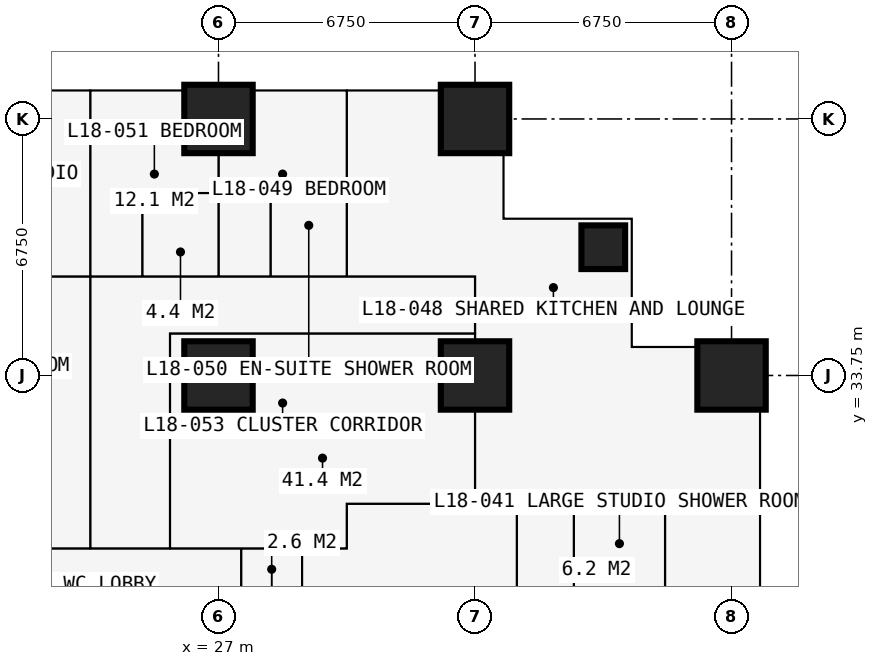
"""IFC4 building model, lengths in metres.
Left out: names, types, materials, properties, quantities, classifications, styles, units other than length and angle.
Written with IfcOpenShell. Run it as: python <this file> out.ifc"""

import sys

from ifc_helpers import new_model, si_unit, direction, frame, frame_2d, origin, origin_2d, place, context, subcontext, project, spatial, rectangle, extrude, element, fill, save


model = new_model("IFC4")
c1 = context("Model", 3, precision=1e-05, world=origin(), true_north=direction((0.0, 1.0)))
c2 = subcontext(c1, "Body", "Model", "MODEL_VIEW")
j1 = project(units=[si_unit("LENGTHUNIT", "METRE"), si_unit("PLANEANGLEUNIT", "RADIAN")], contexts=[c1])
p1 = place(None, origin())
s1 = spatial("IfcSite", under=j1, at=p1, CompositionType="ELEMENT")
p2 = place(p1, origin())
s2 = spatial("IfcBuilding", under=s1, at=p2, CompositionType="ELEMENT")
p3 = place(p2, frame((0.0, 0.0, 68.4)))
s3 = spatial("IfcBuildingStorey", under=s2, at=p3, CompositionType="ELEMENT", Elevation=68.4)
for number, where, z_axis, x_axis in (
    (1, (27.0, 33.75, 0.0), (0.0, 0.0, 1.0), (1.0, 0.0, 0.0)),
    (2, (27.0, 40.5, 0.0), (0.0, 0.0, 1.0), (1.0, 0.0, 0.0)),
    (3, (33.75, 33.75, 0.0), (0.0, 0.0, 1.0), (1.0, 0.0, 0.0)),
    (4, (33.75, 40.5, 0.0), (0.0, 0.0, 1.0), (1.0, 0.0, 0.0)),
):
    element("IfcColumn", number, at=place(p3, frame(where, z_axis=z_axis, x_axis=x_axis)), inside=s3, PredefinedType="COLUMN", context=c2, shape_type="SweptSolid", body=[
        extrude(rectangle(XDim=1.8, YDim=1.8, at=origin_2d()), origin(), (0.0, 0.0, 1.0), 3.6),
    ])
p4 = place(p3, frame((37.125, 37.125, 0.0), z_axis=(0.0, 0.0, 1.0), x_axis=(1.0, 0.0, 0.0)))
e5 = element("IfcColumn", 5, at=p4, inside=s3, PredefinedType="COLUMN", context=c2, shape_type="SweptSolid", body=[
    extrude(rectangle(XDim=1.15, YDim=1.15, at=origin_2d()), origin(), (0.0, 0.0, 1.0), 3.6),
])
p5 = place(p3, frame((40.5, 33.75, 0.0), z_axis=(0.0, 0.0, 1.0), x_axis=(1.0, 0.0, 0.0)))
e6 = element("IfcColumn", 6, at=p5, inside=s3, PredefinedType="COLUMN", context=c2, shape_type="SweptSolid", body=[
    extrude(rectangle(XDim=1.8, YDim=1.8, at=origin_2d()), origin(), (0.0, 0.0, 1.0), 3.6),
])
p6 = place(p3, frame((41.25, 34.5, 0.0), z_axis=(0.0, 0.0, 1.0), x_axis=(-1.0, 0.0, 0.0)))
e7 = element("IfcWall", 7, at=p6, inside=s3, PredefinedType="SOLIDWALL", context=c2, shape_type="SweptSolid", body=[
    extrude(rectangle(XDim=3.375, YDim=0.3, at=frame_2d((1.688, 0.0))), origin(), (0.0, 0.0, 1.0), 3.375),
])
p7 = place(p6, frame((1.833, 0.0, 0.9)))
e8 = element("IfcOpeningElement", 8, at=p7, cuts=e7, PredefinedType="OPENING", context=c2, shape_type="SweptSolid", body=[
    extrude(rectangle(XDim=1.2, YDim=1.8, at=frame_2d((0.6, 0.9))), frame((0.0, 0.16, 0.0), z_axis=(0.0, -1.0, 0.0), x_axis=(1.0, 0.0, 0.0)), (0.0, 0.0, 1.0), 0.32),
])
p8 = place(p3, frame((37.875, 34.5, 0.0), z_axis=(0.0, 0.0, 1.0), x_axis=(0.0, 1.0, 0.0)))
e9 = element("IfcWall", 9, at=p8, inside=s3, PredefinedType="SOLIDWALL", context=c2, shape_type="SweptSolid", body=[
    extrude(rectangle(XDim=3.375, YDim=0.3, at=frame_2d((1.688, 0.0))), origin(), (0.0, 0.0, 1.0), 3.375),
])
p9 = place(p8, frame((0.788, 0.0, 0.6)))
e10 = element("IfcOpeningElement", 10, at=p9, cuts=e9, PredefinedType="OPENING", context=c2, shape_type="SweptSolid", body=[
    extrude(rectangle(XDim=1.8, YDim=2.1, at=frame_2d((0.9, 1.05))), frame((0.0, 0.16, 0.0), z_axis=(0.0, -1.0, 0.0), x_axis=(1.0, 0.0, 0.0)), (0.0, 0.0, 1.0), 0.32),
])
p10 = place(p3, frame((37.875, 37.875, 0.0), z_axis=(0.0, 0.0, 1.0), x_axis=(-1.0, 0.0, 0.0)))
e11 = element("IfcWall", 11, at=p10, inside=s3, PredefinedType="SOLIDWALL", context=c2, shape_type="SweptSolid", body=[
    extrude(rectangle(XDim=3.375, YDim=0.3, at=frame_2d((1.688, 0.0))), origin(), (0.0, 0.0, 1.0), 3.375),
])
p11 = place(p10, frame((0.788, 0.0, 0.6)))
e12 = element("IfcOpeningElement", 12, at=p11, cuts=e11, PredefinedType="OPENING", context=c2, shape_type="SweptSolid", body=[
    extrude(rectangle(XDim=1.8, YDim=2.1, at=frame_2d((0.9, 1.05))), frame((0.0, 0.16, 0.0), z_axis=(0.0, -1.0, 0.0), x_axis=(1.0, 0.0, 0.0)), (0.0, 0.0, 1.0), 0.32),
])
p12 = place(p3, frame((34.5, 37.875, 0.0), z_axis=(0.0, 0.0, 1.0), x_axis=(0.0, 1.0, 0.0)))
e13 = element("IfcWall", 13, at=p12, inside=s3, PredefinedType="SOLIDWALL", context=c2, shape_type="SweptSolid", body=[
    extrude(rectangle(XDim=3.375, YDim=0.3, at=frame_2d((1.688, 0.0))), origin(), (0.0, 0.0, 1.0), 3.375),
])
p13 = place(p12, frame((0.343, 0.0, 0.9)))
e14 = element("IfcOpeningElement", 14, at=p13, cuts=e13, PredefinedType="OPENING", context=c2, shape_type="SweptSolid", body=[
    extrude(rectangle(XDim=1.2, YDim=1.8, at=frame_2d((0.6, 0.9))), frame((0.0, 0.16, 0.0), z_axis=(0.0, -1.0, 0.0), x_axis=(1.0, 0.0, 0.0)), (0.0, 0.0, 1.0), 0.32),
])
p14 = place(p3, frame((10.125, 36.35, 0.0), z_axis=(0.0, 0.0, 1.0), x_axis=(1.0, 0.0, 0.0)))
e15 = element("IfcWall", 15, at=p14, inside=s3, PredefinedType="PARTITIONING", context=c2, shape_type="SweptSolid", body=[
    extrude(rectangle(XDim=23.625, YDim=0.15, at=frame_2d((11.812, 0.0))), origin(), (0.0, 0.0, 1.0), 3.375),
])
p15 = place(p14, frame((21.45, 0.0, 0.0)))
e16 = element("IfcOpeningElement", 16, at=p15, cuts=e15, PredefinedType="OPENING", context=c2, shape_type="SweptSolid", body=[
    extrude(rectangle(XDim=1.0, YDim=2.2, at=frame_2d((0.5, 1.1))), frame((0.0, 0.085, 0.0), z_axis=(0.0, -1.0, 0.0), x_axis=(1.0, 0.0, 0.0)), (0.0, 0.0, 1.0), 0.17),
])
p16 = place(p14, frame((17.125, 0.0, 0.0)))
e17 = element("IfcOpeningElement", 17, at=p16, cuts=e15, PredefinedType="OPENING", context=c2, shape_type="SweptSolid", body=[
    extrude(rectangle(XDim=0.95, YDim=2.2, at=frame_2d((0.475, 1.1))), frame((0.0, 0.085, 0.0), z_axis=(0.0, -1.0, 0.0), x_axis=(1.0, 0.0, 0.0)), (0.0, 0.0, 1.0), 0.17),
])
p17 = place(p14, frame((13.7, 0.0, 0.0)))
e18 = element("IfcOpeningElement", 18, at=p17, cuts=e15, PredefinedType="OPENING", context=c2, shape_type="SweptSolid", body=[
    extrude(rectangle(XDim=0.95, YDim=2.2, at=frame_2d((0.475, 1.1))), frame((0.0, 0.085, 0.0), z_axis=(0.0, -1.0, 0.0), x_axis=(1.0, 0.0, 0.0)), (0.0, 0.0, 1.0), 0.17),
])
p18 = place(p14, frame((4.2, 0.0, 0.0)))
e19 = element("IfcOpeningElement", 19, at=p18, cuts=e15, PredefinedType="OPENING", context=c2, shape_type="SweptSolid", body=[
    extrude(rectangle(XDim=0.95, YDim=2.2, at=frame_2d((0.475, 1.1))), frame((0.0, 0.085, 0.0), z_axis=(0.0, -1.0, 0.0), x_axis=(1.0, 0.0, 0.0)), (0.0, 0.0, 1.0), 0.17),
])
p19 = place(p14, frame((10.95, 0.0, 0.0)))
e20 = element("IfcOpeningElement", 20, at=p19, cuts=e15, PredefinedType="OPENING", context=c2, shape_type="SweptSolid", body=[
    extrude(rectangle(XDim=0.95, YDim=2.2, at=frame_2d((0.475, 1.1))), frame((0.0, 0.085, 0.0), z_axis=(0.0, -1.0, 0.0), x_axis=(1.0, 0.0, 0.0)), (0.0, 0.0, 1.0), 0.17),
])
p20 = place(p3, frame((11.3, 29.2, 0.0), z_axis=(0.0, 0.0, 1.0), x_axis=(1.0, 0.0, 0.0)))
e21 = element("IfcWall", 21, at=p20, inside=s3, PredefinedType="PARTITIONING", context=c2, shape_type="SweptSolid", body=[
    extrude(rectangle(XDim=19.075, YDim=0.15, at=frame_2d((9.538, 0.0))), origin(), (0.0, 0.0, 1.0), 3.375),
])
p21 = place(p20, frame((12.875, 0.0, 0.0)))
e22 = element("IfcOpeningElement", 22, at=p21, cuts=e21, PredefinedType="OPENING", context=c2, shape_type="SweptSolid", body=[
    extrude(rectangle(XDim=1.0, YDim=2.2, at=frame_2d((0.5, 1.1))), frame((0.0, 0.085, 0.0), z_axis=(0.0, -1.0, 0.0), x_axis=(1.0, 0.0, 0.0)), (0.0, 0.0, 1.0), 0.17),
])
p22 = place(p20, frame((10.438, 0.0, 0.0)))
e23 = element("IfcOpeningElement", 23, at=p22, cuts=e21, PredefinedType="OPENING", context=c2, shape_type="SweptSolid", body=[
    extrude(rectangle(XDim=1.0, YDim=2.2, at=frame_2d((0.5, 1.1))), frame((0.0, 0.085, 0.0), z_axis=(0.0, -1.0, 0.0), x_axis=(1.0, 0.0, 0.0)), (0.0, 0.0, 1.0), 0.17),
])
p23 = place(p20, frame((14.875, 0.0, 0.0)))
e24 = element("IfcOpeningElement", 24, at=p23, cuts=e21, PredefinedType="OPENING", context=c2, shape_type="SweptSolid", body=[
    extrude(rectangle(XDim=0.95, YDim=2.2, at=frame_2d((0.475, 1.1))), frame((0.0, 0.085, 0.0), z_axis=(0.0, -1.0, 0.0), x_axis=(1.0, 0.0, 0.0)), (0.0, 0.0, 1.0), 0.17),
])
p24 = place(p3, frame((23.625, 29.2, 0.0), z_axis=(0.0, 0.0, 1.0), x_axis=(0.0, 1.0, 0.0)))
e25 = element("IfcWall", 25, at=p24, inside=s3, PredefinedType="PARTITIONING", context=c2, shape_type="SweptSolid", body=[
    extrude(rectangle(XDim=12.034, YDim=0.15, at=frame_2d((6.017, 0.0))), origin(), (0.0, 0.0, 1.0), 3.375),
])
p25 = place(p3, frame((25.0, 36.35, 0.0), z_axis=(0.0, 0.0, 1.0), x_axis=(0.0, 1.0, 0.0)))
e26 = element("IfcWall", 26, at=p25, inside=s3, PredefinedType="PARTITIONING", context=c2, shape_type="SweptSolid", body=[
    extrude(rectangle(XDim=2.2, YDim=0.1, at=frame_2d((1.1, 0.0))), origin(), (0.0, 0.0, 1.0), 3.375),
])
p26 = place(p3, frame((25.0, 38.55, 0.0), z_axis=(0.0, 0.0, 1.0), x_axis=(1.0, 0.0, 0.0)))
e27 = element("IfcWall", 27, at=p26, inside=s3, PredefinedType="PARTITIONING", context=c2, shape_type="SweptSolid", body=[
    extrude(rectangle(XDim=2.0, YDim=0.1, at=frame_2d((1.0, 0.0))), origin(), (0.0, 0.0, 1.0), 3.375),
])
p27 = place(p3, frame((25.725, 29.2, 0.0), z_axis=(0.0, 0.0, 1.0), x_axis=(0.0, 1.0, 0.0)))
e28 = element("IfcWall", 28, at=p27, inside=s3, PredefinedType="PARTITIONING", context=c2, shape_type="SweptSolid", body=[
    extrude(rectangle(XDim=5.65, YDim=0.15, at=frame_2d((2.825, 0.0))), origin(), (0.0, 0.0, 1.0), 3.375),
])
p28 = place(p3, frame((25.725, 34.85, 0.0), z_axis=(0.0, 0.0, 1.0), x_axis=(1.0, 0.0, 0.0)))
e29 = element("IfcWall", 29, at=p28, inside=s3, PredefinedType="PARTITIONING", context=c2, shape_type="SweptSolid", body=[
    extrude(rectangle(XDim=8.025, YDim=0.15, at=frame_2d((4.012, 0.0))), origin(), (0.0, 0.0, 1.0), 3.375),
])
p29 = place(p3, frame((27.0, 36.35, 0.0), z_axis=(0.0, 0.0, 1.0), x_axis=(0.0, 1.0, 0.0)))
e30 = element("IfcWall", 30, at=p29, inside=s3, PredefinedType="PARTITIONING", context=c2, shape_type="SweptSolid", body=[
    extrude(rectangle(XDim=4.884, YDim=0.175, at=frame_2d((2.442, 0.0))), origin(), (0.0, 0.0, 1.0), 2.61),
])
p30 = place(p29, frame((0.65, 0.0, 0.0)))
e31 = element("IfcOpeningElement", 31, at=p30, cuts=e30, PredefinedType="OPENING", context=c2, shape_type="SweptSolid", body=[
    extrude(rectangle(XDim=0.9, YDim=2.2, at=frame_2d((0.45, 1.1))), frame((0.0, 0.097, 0.0), z_axis=(0.0, -1.0, 0.0), x_axis=(1.0, 0.0, 0.0)), (0.0, 0.0, 1.0), 0.195),
])
p31 = place(p3, frame((27.6, 27.6, 0.0), z_axis=(0.0, 0.0, 1.0), x_axis=(0.0, 1.0, 0.0)))
e32 = element("IfcWall", 32, at=p31, inside=s3, PredefinedType="PARTITIONING", context=c2, shape_type="SweptSolid", body=[
    extrude(rectangle(XDim=1.6, YDim=0.15, at=frame_2d((0.8, 0.0))), origin(), (0.0, 0.0, 1.0), 3.375),
])
p32 = place(p31, frame((0.3, 0.0, 0.0)))
e33 = element("IfcOpeningElement", 33, at=p32, cuts=e32, PredefinedType="OPENING", context=c2, shape_type="SweptSolid", body=[
    extrude(rectangle(XDim=0.95, YDim=2.2, at=frame_2d((0.475, 1.1))), frame((0.0, 0.085, 0.0), z_axis=(0.0, -1.0, 0.0), x_axis=(1.0, 0.0, 0.0)), (0.0, 0.0, 1.0), 0.17),
])
p33 = place(p3, frame((28.375, 36.35, 0.0), z_axis=(0.0, 0.0, 1.0), x_axis=(0.0, 1.0, 0.0)))
e34 = element("IfcWall", 34, at=p33, inside=s3, PredefinedType="PARTITIONING", context=c2, shape_type="SweptSolid", body=[
    extrude(rectangle(XDim=2.2, YDim=0.1, at=frame_2d((1.1, 0.0))), origin(), (0.0, 0.0, 1.0), 3.375),
])
p34 = place(p33, frame((0.65, 0.0, 0.0)))
e35 = element("IfcOpeningElement", 35, at=p34, cuts=e34, PredefinedType="OPENING", context=c2, shape_type="SweptSolid", body=[
    extrude(rectangle(XDim=0.9, YDim=2.2, at=frame_2d((0.45, 1.1))), frame((0.0, 0.06, 0.0), z_axis=(0.0, -1.0, 0.0), x_axis=(1.0, 0.0, 0.0)), (0.0, 0.0, 1.0), 0.12),
])
p35 = place(p3, frame((28.375, 38.55, 0.0), z_axis=(0.0, 0.0, 1.0), x_axis=(1.0, 0.0, 0.0)))
e36 = element("IfcWall", 36, at=p35, inside=s3, PredefinedType="PARTITIONING", context=c2, shape_type="SweptSolid", body=[
    extrude(rectangle(XDim=2.0, YDim=0.1, at=frame_2d((1.0, 0.0))), origin(), (0.0, 0.0, 1.0), 3.375),
])
p36 = place(p3, frame((29.2, 11.3, 0.0), z_axis=(0.0, 0.0, 1.0), x_axis=(0.0, 1.0, 0.0)))
e37 = element("IfcWall", 37, at=p36, inside=s3, PredefinedType="PARTITIONING", context=c2, shape_type="SweptSolid", body=[
    extrude(rectangle(XDim=17.9, YDim=0.2, at=frame_2d((8.95, 0.0))), origin(), (0.0, 0.0, 1.0), 3.375),
])
p37 = place(p36, frame((8.35, 0.0, 0.0)))
e38 = element("IfcOpeningElement", 38, at=p37, cuts=e37, PredefinedType="OPENING", context=c2, shape_type="SweptSolid", body=[
    extrude(rectangle(XDim=1.2, YDim=2.2, at=frame_2d((0.6, 1.1))), frame((0.0, 0.11, 0.0), z_axis=(0.0, -1.0, 0.0), x_axis=(1.0, 0.0, 0.0)), (0.0, 0.0, 1.0), 0.22),
])
p38 = place(p3, frame((30.375, 29.2, 0.0), z_axis=(0.0, 0.0, 1.0), x_axis=(0.0, 1.0, 0.0)))
e39 = element("IfcWall", 39, at=p38, inside=s3, PredefinedType="PARTITIONING", context=c2, shape_type="SweptSolid", body=[
    extrude(rectangle(XDim=1.175, YDim=0.15, at=frame_2d((0.587, 0.0))), origin(), (0.0, 0.0, 1.0), 3.375),
])
p39 = place(p3, frame((30.375, 30.375, 0.0), z_axis=(0.0, 0.0, 1.0), x_axis=(1.0, 0.0, 0.0)))
e40 = element("IfcWall", 40, at=p39, inside=s3, PredefinedType="PARTITIONING", context=c2, shape_type="SweptSolid", body=[
    extrude(rectangle(XDim=10.859, YDim=0.15, at=frame_2d((5.429, 0.0))), origin(), (0.0, 0.0, 1.0), 3.375),
])
p40 = place(p3, frame((30.375, 36.35, 0.0), z_axis=(0.0, 0.0, 1.0), x_axis=(0.0, 1.0, 0.0)))
e41 = element("IfcWall", 41, at=p40, inside=s3, PredefinedType="PARTITIONING", context=c2, shape_type="SweptSolid", body=[
    extrude(rectangle(XDim=4.884, YDim=0.15, at=frame_2d((2.442, 0.0))), origin(), (0.0, 0.0, 1.0), 3.375),
])
p41 = place(p3, frame((33.75, 30.375, 0.0), z_axis=(0.0, 0.0, 1.0), x_axis=(0.0, 1.0, 0.0)))
e42 = element("IfcWall", 42, at=p41, inside=s3, PredefinedType="PARTITIONING", context=c2, shape_type="SweptSolid", body=[
    extrude(rectangle(XDim=5.975, YDim=0.15, at=frame_2d((2.988, 0.0))), origin(), (0.0, 0.0, 1.0), 2.877),
])
p42 = place(p3, frame((34.85, 12.55, 0.0), z_axis=(0.0, 0.0, 1.0), x_axis=(0.0, 1.0, 0.0)))
e43 = element("IfcWall", 43, at=p42, inside=s3, PredefinedType="PARTITIONING", context=c2, shape_type="SweptSolid", body=[
    extrude(rectangle(XDim=17.825, YDim=0.15, at=frame_2d((8.913, 0.0))), origin(), (0.0, 0.0, 1.0), 3.375),
])
p43 = place(p42, frame((8.6, 0.0, 0.0)))
e44 = element("IfcOpeningElement", 44, at=p43, cuts=e43, PredefinedType="OPENING", context=c2, shape_type="SweptSolid", body=[
    extrude(rectangle(XDim=0.95, YDim=2.2, at=frame_2d((0.475, 1.1))), frame((0.0, 0.085, 0.0), z_axis=(0.0, -1.0, 0.0), x_axis=(1.0, 0.0, 0.0)), (0.0, 0.0, 1.0), 0.17),
])
p44 = place(p3, frame((36.35, 6.75, 0.0), z_axis=(0.0, 0.0, 1.0), x_axis=(0.0, 1.0, 0.0)))
e45 = element("IfcWall", 45, at=p44, inside=s3, PredefinedType="PARTITIONING", context=c2, shape_type="SweptSolid", body=[
    extrude(rectangle(XDim=23.625, YDim=0.15, at=frame_2d((11.812, 0.0))), origin(), (0.0, 0.0, 1.0), 3.375),
])
p45 = place(p44, frame((0.2, 0.0, 0.0)))
e46 = element("IfcOpeningElement", 46, at=p45, cuts=e45, PredefinedType="OPENING", context=c2, shape_type="SweptSolid", body=[
    extrude(rectangle(XDim=0.95, YDim=2.2, at=frame_2d((0.475, 1.1))), frame((0.0, 0.085, 0.0), z_axis=(0.0, -1.0, 0.0), x_axis=(1.0, 0.0, 0.0)), (0.0, 0.0, 1.0), 0.17),
])
p46 = place(p44, frame((18.475, 0.0, 0.0)))
e47 = element("IfcOpeningElement", 47, at=p46, cuts=e45, PredefinedType="OPENING", context=c2, shape_type="SweptSolid", body=[
    extrude(rectangle(XDim=0.95, YDim=2.2, at=frame_2d((0.475, 1.1))), frame((0.0, 0.085, 0.0), z_axis=(0.0, -1.0, 0.0), x_axis=(1.0, 0.0, 0.0)), (0.0, 0.0, 1.0), 0.17),
])
p47 = place(p44, frame((11.725, 0.0, 0.0)))
e48 = element("IfcOpeningElement", 48, at=p47, cuts=e45, PredefinedType="OPENING", context=c2, shape_type="SweptSolid", body=[
    extrude(rectangle(XDim=0.95, YDim=2.2, at=frame_2d((0.475, 1.1))), frame((0.0, 0.085, 0.0), z_axis=(0.0, -1.0, 0.0), x_axis=(1.0, 0.0, 0.0)), (0.0, 0.0, 1.0), 0.17),
])
p48 = place(p44, frame((4.975, 0.0, 0.0)))
e49 = element("IfcOpeningElement", 49, at=p48, cuts=e45, PredefinedType="OPENING", context=c2, shape_type="SweptSolid", body=[
    extrude(rectangle(XDim=0.95, YDim=2.2, at=frame_2d((0.475, 1.1))), frame((0.0, 0.085, 0.0), z_axis=(0.0, -1.0, 0.0), x_axis=(1.0, 0.0, 0.0)), (0.0, 0.0, 1.0), 0.17),
])
p49 = place(p3, frame((38.75, 27.775, 0.0), z_axis=(0.0, 0.0, 1.0), x_axis=(0.0, 1.0, 0.0)))
e50 = element("IfcWall", 50, at=p49, inside=s3, PredefinedType="PARTITIONING", context=c2, shape_type="SweptSolid", body=[
    extrude(rectangle(XDim=2.6, YDim=0.1, at=frame_2d((1.3, 0.0))), origin(), (0.0, 0.0, 1.0), 3.375),
])
p50 = place(p49, frame((0.85, 0.0, 0.0)))
e51 = element("IfcOpeningElement", 51, at=p50, cuts=e50, PredefinedType="OPENING", context=c2, shape_type="SweptSolid", body=[
    extrude(rectangle(XDim=0.9, YDim=2.2, at=frame_2d((0.45, 1.1))), frame((0.0, 0.06, 0.0), z_axis=(0.0, -1.0, 0.0), x_axis=(1.0, 0.0, 0.0)), (0.0, 0.0, 1.0), 0.12),
])
p51 = place(p7, origin())
e52 = element("IfcWindow", 52, at=p51, inside=s3, PartitioningType="SINGLE_PANEL", PredefinedType="WINDOW", context=c2, shape_type="SweptSolid", body=[
    extrude(rectangle(XDim=1.2, YDim=1.8, at=frame_2d((0.6, 0.9))), frame((0.0, 0.03, 0.0), z_axis=(0.0, -1.0, 0.0), x_axis=(1.0, 0.0, 0.0)), (0.0, 0.0, 1.0), 0.06),
])
fill(e8, e52)
p52 = place(p9, origin())
e53 = element("IfcWindow", 53, at=p52, inside=s3, PartitioningType="SINGLE_PANEL", PredefinedType="WINDOW", context=c2, shape_type="SweptSolid", body=[
    extrude(rectangle(XDim=1.8, YDim=2.1, at=frame_2d((0.9, 1.05))), frame((0.0, 0.03, 0.0), z_axis=(0.0, -1.0, 0.0), x_axis=(1.0, 0.0, 0.0)), (0.0, 0.0, 1.0), 0.06),
])
fill(e10, e53)
p53 = place(p11, origin())
e54 = element("IfcWindow", 54, at=p53, inside=s3, PartitioningType="SINGLE_PANEL", PredefinedType="WINDOW", context=c2, shape_type="SweptSolid", body=[
    extrude(rectangle(XDim=1.8, YDim=2.1, at=frame_2d((0.9, 1.05))), frame((0.0, 0.03, 0.0), z_axis=(0.0, -1.0, 0.0), x_axis=(1.0, 0.0, 0.0)), (0.0, 0.0, 1.0), 0.06),
])
fill(e12, e54)
p54 = place(p13, origin())
e55 = element("IfcWindow", 55, at=p54, inside=s3, PartitioningType="SINGLE_PANEL", PredefinedType="WINDOW", context=c2, shape_type="SweptSolid", body=[
    extrude(rectangle(XDim=1.2, YDim=1.8, at=frame_2d((0.6, 0.9))), frame((0.0, 0.03, 0.0), z_axis=(0.0, -1.0, 0.0), x_axis=(1.0, 0.0, 0.0)), (0.0, 0.0, 1.0), 0.06),
])
fill(e14, e55)
p55 = place(p32, origin())
e56 = element("IfcDoor", 56, at=p55, inside=s3, OperationType="SINGLE_SWING_LEFT", PredefinedType="DOOR", context=c2, shape_type="SweptSolid", body=[
    extrude(rectangle(XDim=0.95, YDim=2.2, at=frame_2d((0.475, 1.1))), frame((0.0, 0.025, 0.0), z_axis=(0.0, -1.0, 0.0), x_axis=(1.0, 0.0, 0.0)), (0.0, 0.0, 1.0), 0.05),
])
fill(e33, e56)
p56 = place(p50, origin())
e57 = element("IfcDoor", 57, at=p56, inside=s3, OperationType="SINGLE_SWING_RIGHT", PredefinedType="DOOR", context=c2, shape_type="SweptSolid", body=[
    extrude(rectangle(XDim=0.9, YDim=2.2, at=frame_2d((0.45, 1.1))), frame((0.0, 0.025, 0.0), z_axis=(0.0, -1.0, 0.0), x_axis=(1.0, 0.0, 0.0)), (0.0, 0.0, 1.0), 0.05),
])
fill(e51, e57)
p57 = place(p15, origin())
e58 = element("IfcDoor", 58, at=p57, inside=s3, OperationType="SINGLE_SWING_LEFT", PredefinedType="DOOR", context=c2, shape_type="SweptSolid", body=[
    extrude(rectangle(XDim=1.0, YDim=2.2, at=frame_2d((0.5, 1.1))), frame((0.0, 0.025, 0.0), z_axis=(0.0, -1.0, 0.0), x_axis=(1.0, 0.0, 0.0)), (0.0, 0.0, 1.0), 0.05),
])
fill(e16, e58)
p58 = place(p16, origin())
e59 = element("IfcDoor", 59, at=p58, inside=s3, OperationType="SINGLE_SWING_LEFT", PredefinedType="DOOR", context=c2, shape_type="SweptSolid", body=[
    extrude(rectangle(XDim=0.95, YDim=2.2, at=frame_2d((0.475, 1.1))), frame((0.0, 0.025, 0.0), z_axis=(0.0, -1.0, 0.0), x_axis=(1.0, 0.0, 0.0)), (0.0, 0.0, 1.0), 0.05),
])
fill(e17, e59)
p59 = place(p34, origin())
e60 = element("IfcDoor", 60, at=p59, inside=s3, OperationType="SINGLE_SWING_RIGHT", PredefinedType="DOOR", context=c2, shape_type="SweptSolid", body=[
    extrude(rectangle(XDim=0.9, YDim=2.2, at=frame_2d((0.45, 1.1))), frame((0.0, 0.025, 0.0), z_axis=(0.0, -1.0, 0.0), x_axis=(1.0, 0.0, 0.0)), (0.0, 0.0, 1.0), 0.05),
])
fill(e35, e60)
p60 = place(p17, origin())
e61 = element("IfcDoor", 61, at=p60, inside=s3, OperationType="SINGLE_SWING_LEFT", PredefinedType="DOOR", context=c2, shape_type="SweptSolid", body=[
    extrude(rectangle(XDim=0.95, YDim=2.2, at=frame_2d((0.475, 1.1))), frame((0.0, 0.025, 0.0), z_axis=(0.0, -1.0, 0.0), x_axis=(1.0, 0.0, 0.0)), (0.0, 0.0, 1.0), 0.05),
])
fill(e18, e61)
p61 = place(p30, origin())
e62 = element("IfcDoor", 62, at=p61, inside=s3, OperationType="SINGLE_SWING_RIGHT", PredefinedType="DOOR", context=c2, shape_type="SweptSolid", body=[
    extrude(rectangle(XDim=0.9, YDim=2.2, at=frame_2d((0.45, 1.1))), frame((0.0, 0.025, 0.0), z_axis=(0.0, -1.0, 0.0), x_axis=(1.0, 0.0, 0.0)), (0.0, 0.0, 1.0), 0.05),
])
fill(e31, e62)
p62 = place(p21, origin())
e63 = element("IfcDoor", 63, at=p62, inside=s3, OperationType="SINGLE_SWING_LEFT", PredefinedType="DOOR", context=c2, shape_type="SweptSolid", body=[
    extrude(rectangle(XDim=1.0, YDim=2.2, at=frame_2d((0.5, 1.1))), frame((0.0, 0.025, 0.0), z_axis=(0.0, -1.0, 0.0), x_axis=(1.0, 0.0, 0.0)), (0.0, 0.0, 1.0), 0.05),
])
fill(e22, e63)
p63 = place(p22, origin())
e64 = element("IfcDoor", 64, at=p63, inside=s3, OperationType="SINGLE_SWING_LEFT", PredefinedType="DOOR", context=c2, shape_type="SweptSolid", body=[
    extrude(rectangle(XDim=1.0, YDim=2.2, at=frame_2d((0.5, 1.1))), frame((0.0, 0.025, 0.0), z_axis=(0.0, -1.0, 0.0), x_axis=(1.0, 0.0, 0.0)), (0.0, 0.0, 1.0), 0.05),
])
fill(e23, e64)
p64 = place(p23, origin())
e65 = element("IfcDoor", 65, at=p64, inside=s3, OperationType="SINGLE_SWING_LEFT", PredefinedType="DOOR", context=c2, shape_type="SweptSolid", body=[
    extrude(rectangle(XDim=0.95, YDim=2.2, at=frame_2d((0.475, 1.1))), frame((0.0, 0.025, 0.0), z_axis=(0.0, -1.0, 0.0), x_axis=(1.0, 0.0, 0.0)), (0.0, 0.0, 1.0), 0.05),
])
fill(e24, e65)
save(model, sys.argv[1])
